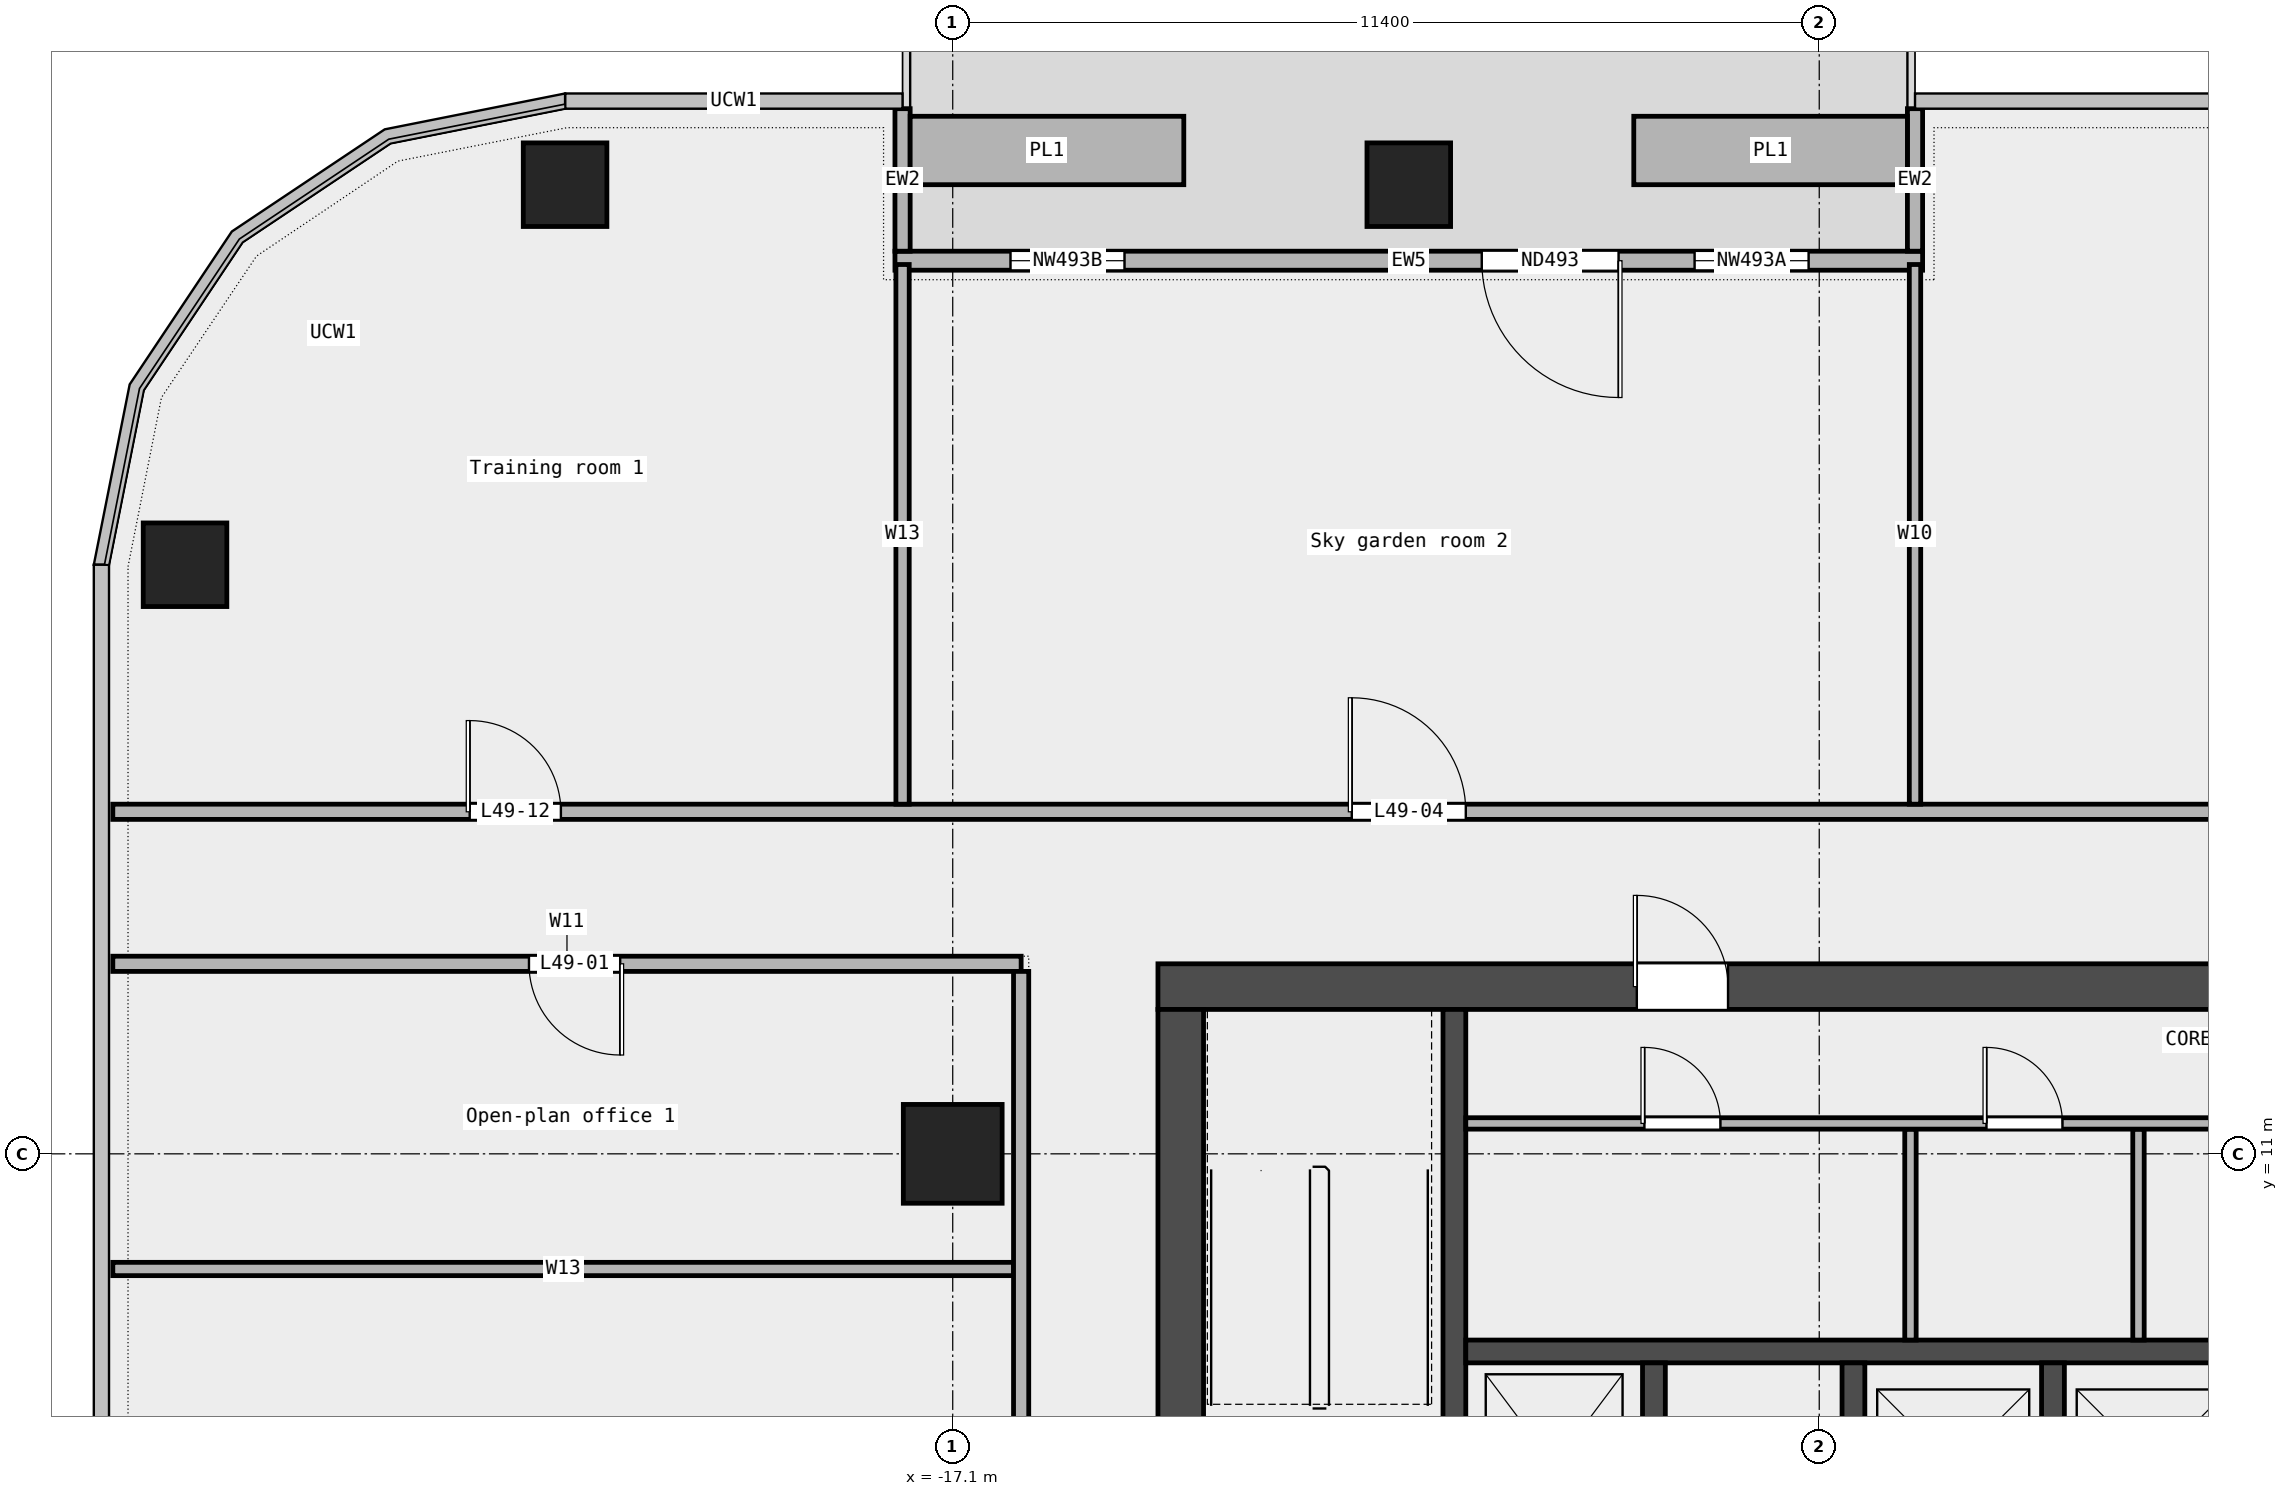
"""IFC4 building model, lengths in metres.
Left out: names, types, materials, properties, quantities, classifications, styles, units other than length and angle.
Written with IfcOpenShell. Run it as: python <this file> out.ifc"""

import sys

from ifc_helpers import new_model, si_unit, direction, frame, frame_2d, origin, origin_2d, place, context, subcontext, project, spatial, rectangle, extrude, element, fill, save


model = new_model("IFC4")
c1 = context("Model", 3, precision=1e-05, world=origin(), true_north=direction((0.0, 1.0)))
c2 = subcontext(c1, "Body", "Model", "MODEL_VIEW")
j1 = project(units=[si_unit("LENGTHUNIT", "METRE"), si_unit("PLANEANGLEUNIT", "RADIAN")], contexts=[c1])
p1 = place(None, origin())
s1 = spatial("IfcSite", under=j1, at=p1, CompositionType="ELEMENT")
p2 = place(p1, origin())
s2 = spatial("IfcBuilding", under=s1, at=p2, CompositionType="ELEMENT")
p3 = place(p2, frame((0.0, 0.0, 231.0)))
s3 = spatial("IfcBuildingStorey", under=s2, at=p3, CompositionType="ELEMENT", Elevation=231.0)
for number, where, z_axis, x_axis in (
    (1, (-11.1, 23.75, 0.0), (0.0, 0.0, 1.0), (1.0, 0.0, 0.0)),
    (2, (-22.2, 23.75, 0.0), (0.0, 0.0, 1.0), (1.0, 0.0, 0.0)),
    (3, (-27.2, 18.75, 0.0), (0.0, 0.0, 1.0), (1.0, 0.0, 0.0)),
):
    element("IfcColumn", number, at=place(p3, frame(where, z_axis=z_axis, x_axis=x_axis)), inside=s3, PredefinedType="COLUMN", context=c2, shape_type="SweptSolid", body=[
        extrude(rectangle(XDim=1.1, YDim=1.1, at=origin_2d()), origin(), (0.0, 0.0, 1.0), 3.6),
    ])
p4 = place(p3, frame((-17.1, 11.0, 0.0), z_axis=(0.0, 0.0, 1.0), x_axis=(1.0, 0.0, 0.0)))
e4 = element("IfcColumn", 4, at=p4, inside=s3, PredefinedType="COLUMN", context=c2, shape_type="SweptSolid", body=[
    extrude(rectangle(XDim=1.3, YDim=1.3, at=origin_2d()), origin(), (0.0, 0.0, 1.0), 3.6),
])
p5 = place(p3, frame((-4.34, 22.75, 0.0), z_axis=(0.0, 0.0, 1.0), x_axis=(-1.0, 0.0, 0.0)))
e5 = element("IfcWall", 5, at=p5, inside=s3, PredefinedType="STANDARD", context=c2, shape_type="SweptSolid", body=[
    extrude(rectangle(XDim=13.52, YDim=0.25, at=frame_2d((6.76, 0.0))), origin(), (0.0, 0.0, 1.0), 3.6),
])
p6 = place(p5, frame((1.5, 0.0, 0.45)))
e6 = element("IfcOpeningElement", 6, at=p6, cuts=e5, PredefinedType="OPENING", context=c2, shape_type="SweptSolid", body=[
    extrude(rectangle(XDim=1.5, YDim=2.4, at=frame_2d((0.75, 1.2))), frame((0.0, 0.137, 0.0), z_axis=(0.0, -1.0, 0.0), x_axis=(1.0, 0.0, 0.0)), (0.0, 0.0, 1.0), 0.274),
])
p7 = place(p5, frame((4.0, 0.0, 0.0)))
e7 = element("IfcOpeningElement", 7, at=p7, cuts=e5, PredefinedType="OPENING", context=c2, shape_type="SweptSolid", body=[
    extrude(rectangle(XDim=1.8, YDim=2.4, at=frame_2d((0.9, 1.2))), frame((0.0, 0.137, 0.0), z_axis=(0.0, -1.0, 0.0), x_axis=(1.0, 0.0, 0.0)), (0.0, 0.0, 1.0), 0.274),
])
p8 = place(p5, frame((10.5, 0.0, 0.45)))
e8 = element("IfcOpeningElement", 8, at=p8, cuts=e5, PredefinedType="OPENING", context=c2, shape_type="SweptSolid", body=[
    extrude(rectangle(XDim=1.5, YDim=2.4, at=frame_2d((0.75, 1.2))), frame((0.0, 0.137, 0.0), z_axis=(0.0, -1.0, 0.0), x_axis=(1.0, 0.0, 0.0)), (0.0, 0.0, 1.0), 0.274),
])
for number, where, z_axis, x_axis in (
    (9, (-4.44, 24.75, 0.0), (0.0, 0.0, 1.0), (0.0, -1.0, 0.0)),
    (10, (-17.76, 24.75, 0.0), (0.0, 0.0, 1.0), (0.0, -1.0, 0.0)),
):
    element("IfcWall", number, at=place(p3, frame(where, z_axis=z_axis, x_axis=x_axis)), inside=s3, PredefinedType="STANDARD", context=c2, shape_type="SweptSolid", body=[
        extrude(rectangle(XDim=1.875, YDim=0.2, at=frame_2d((0.938, 0.0))), origin(), (0.0, 0.0, 1.0), 3.6),
    ])
for number, where, z_axis, x_axis in (
    (11, (-4.54, 24.2, 0.0), (0.0, 0.0, 1.0), (-1.0, 0.0, 0.0)),
    (12, (-14.06, 24.2, 0.0), (0.0, 0.0, 1.0), (-1.0, 0.0, 0.0)),
):
    element("IfcWall", number, at=place(p3, frame(where, z_axis=z_axis, x_axis=x_axis)), inside=s3, PredefinedType="STANDARD", context=c2, shape_type="SweptSolid", body=[
        extrude(rectangle(XDim=3.6, YDim=0.9, at=frame_2d((1.8, 0.0))), origin(), (0.0, 0.0, 1.0), 0.7),
    ])
p9 = place(p3, frame((-28.15, 9.485, 0.0), z_axis=(0.0, 0.0, 1.0), x_axis=(1.0, 0.0, 0.0)))
e13 = element("IfcWall", 13, at=p9, inside=s3, PredefinedType="PARTITIONING", context=c2, shape_type="SweptSolid", body=[
    extrude(rectangle(XDim=11.85, YDim=0.175, at=frame_2d((5.925, 0.0))), origin(), (0.0, 0.0, 1.0), 3.6),
])
p10 = place(p3, frame((-28.15, 13.5, 0.0), z_axis=(0.0, 0.0, 1.0), x_axis=(1.0, 0.0, 0.0)))
e14 = element("IfcWall", 14, at=p10, inside=s3, PredefinedType="PARTITIONING", context=c2, shape_type="SweptSolid", body=[
    extrude(rectangle(XDim=11.95, YDim=0.2, at=frame_2d((5.975, 0.0))), origin(), (0.0, 0.0, 1.0), 3.6),
])
p11 = place(p10, frame((5.475, 0.0, 0.0)))
e15 = element("IfcOpeningElement", 15, at=p11, cuts=e14, PredefinedType="OPENING", context=c2, shape_type="SweptSolid", body=[
    extrude(rectangle(XDim=1.2, YDim=2.1, at=frame_2d((0.6, 1.05))), frame((0.0, 0.112, 0.0), z_axis=(0.0, -1.0, 0.0), x_axis=(1.0, 0.0, 0.0)), (0.0, 0.0, 1.0), 0.224),
])
p12 = place(p3, frame((-28.15, 15.5, 0.0), z_axis=(0.0, 0.0, 1.0), x_axis=(1.0, 0.0, 0.0)))
e16 = element("IfcWall", 16, at=p12, inside=s3, PredefinedType="PARTITIONING", context=c2, shape_type="SweptSolid", body=[
    extrude(rectangle(XDim=56.3, YDim=0.2, at=frame_2d((28.15, 0.0))), origin(), (0.0, 0.0, 1.0), 3.6),
])
p13 = place(p12, frame((16.3, 0.0, 0.0)))
e17 = element("IfcOpeningElement", 17, at=p13, cuts=e16, PredefinedType="OPENING", context=c2, shape_type="SweptSolid", body=[
    extrude(rectangle(XDim=1.5, YDim=2.1, at=frame_2d((0.75, 1.05))), frame((0.0, 0.112, 0.0), z_axis=(0.0, -1.0, 0.0), x_axis=(1.0, 0.0, 0.0)), (0.0, 0.0, 1.0), 0.224),
])
p14 = place(p12, frame((46.225, 0.0, 0.0)))
e18 = element("IfcOpeningElement", 18, at=p14, cuts=e16, PredefinedType="OPENING", context=c2, shape_type="SweptSolid", body=[
    extrude(rectangle(XDim=1.8, YDim=2.1, at=frame_2d((0.9, 1.05))), frame((0.0, 0.112, 0.0), z_axis=(0.0, -1.0, 0.0), x_axis=(1.0, 0.0, 0.0)), (0.0, 0.0, 1.0), 0.224),
])
p15 = place(p12, frame((30.18, 0.0, 0.0)))
e19 = element("IfcOpeningElement", 19, at=p15, cuts=e16, PredefinedType="OPENING", context=c2, shape_type="SweptSolid", body=[
    extrude(rectangle(XDim=1.5, YDim=2.1, at=frame_2d((0.75, 1.05))), frame((0.0, 0.112, 0.0), z_axis=(0.0, -1.0, 0.0), x_axis=(1.0, 0.0, 0.0)), (0.0, 0.0, 1.0), 0.224),
])
p16 = place(p12, frame((4.695, 0.0, 0.0)))
e20 = element("IfcOpeningElement", 20, at=p16, cuts=e16, PredefinedType="OPENING", context=c2, shape_type="SweptSolid", body=[
    extrude(rectangle(XDim=1.2, YDim=2.1, at=frame_2d((0.6, 1.05))), frame((0.0, 0.112, 0.0), z_axis=(0.0, -1.0, 0.0), x_axis=(1.0, 0.0, 0.0)), (0.0, 0.0, 1.0), 0.224),
])
p17 = place(p3, frame((-17.76, 15.6, 0.0), z_axis=(0.0, 0.0, 1.0), x_axis=(0.0, 1.0, 0.0)))
e21 = element("IfcWall", 21, at=p17, inside=s3, PredefinedType="PARTITIONING", context=c2, shape_type="SweptSolid", body=[
    extrude(rectangle(XDim=7.1, YDim=0.175, at=frame_2d((3.55, 0.0))), origin(), (0.0, 0.0, 1.0), 3.6),
])
p18 = place(p3, frame((-16.2, -7.1, 0.0), z_axis=(0.0, 0.0, 1.0), x_axis=(0.0, 1.0, 0.0)))
e22 = element("IfcWall", 22, at=p18, inside=s3, PredefinedType="PARTITIONING", context=c2, shape_type="SweptSolid", body=[
    extrude(rectangle(XDim=20.5, YDim=0.2, at=frame_2d((10.25, 0.0))), origin(), (0.0, 0.0, 1.0), 3.6),
])
p19 = place(p18, frame((11.63, 0.0, 0.0)))
e23 = element("IfcOpeningElement", 23, at=p19, cuts=e22, PredefinedType="OPENING", context=c2, shape_type="SweptSolid", body=[
    extrude(rectangle(XDim=1.5, YDim=2.1, at=frame_2d((0.75, 1.05))), frame((0.0, 0.112, 0.0), z_axis=(0.0, -1.0, 0.0), x_axis=(1.0, 0.0, 0.0)), (0.0, 0.0, 1.0), 0.224),
])
p20 = place(p3, frame((-4.44, 15.6, 0.0), z_axis=(0.0, 0.0, 1.0), x_axis=(0.0, 1.0, 0.0)))
e24 = element("IfcWall", 24, at=p20, inside=s3, PredefinedType="PARTITIONING", context=c2, shape_type="SweptSolid", body=[
    extrude(rectangle(XDim=7.1, YDim=0.15, at=frame_2d((3.55, 0.0))), origin(), (0.0, 0.0, 1.0), 3.6),
])
p21 = place(p3, frame((-14.4, 13.2, 0.0), z_axis=(0.0, 0.0, 1.0), x_axis=(1.0, 0.0, 0.0)))
e25 = element("IfcWall", 25, at=p21, inside=s3, PredefinedType="SHEAR", context=c2, shape_type="SweptSolid", body=[
    extrude(rectangle(XDim=28.8, YDim=0.6, at=frame_2d((14.4, 0.0))), origin(), (0.0, 0.0, 1.0), 3.7),
])
p22 = place(p21, frame((6.3, 0.0, 0.0)))
e26 = element("IfcOpeningElement", 26, at=p22, cuts=e25, PredefinedType="OPENING", context=c2, shape_type="SweptSolid", body=[
    extrude(rectangle(XDim=1.2, YDim=2.1, at=frame_2d((0.6, 1.05))), frame((0.0, 0.312, 0.0), z_axis=(0.0, -1.0, 0.0), x_axis=(1.0, 0.0, 0.0)), (0.0, 0.0, 1.0), 0.624),
])
p23 = place(p21, frame((21.3, 0.0, 0.0)))
e27 = element("IfcOpeningElement", 27, at=p23, cuts=e25, PredefinedType="OPENING", context=c2, shape_type="SweptSolid", body=[
    extrude(rectangle(XDim=1.2, YDim=2.1, at=frame_2d((0.6, 1.05))), frame((0.0, 0.312, 0.0), z_axis=(0.0, -1.0, 0.0), x_axis=(1.0, 0.0, 0.0)), (0.0, 0.0, 1.0), 0.624),
])
p24 = place(p3, frame((-14.1, -6.6, 0.0), z_axis=(0.0, 0.0, 1.0), x_axis=(0.0, 1.0, 0.0)))
e28 = element("IfcWall", 28, at=p24, inside=s3, PredefinedType="SHEAR", context=c2, shape_type="SweptSolid", body=[
    extrude(rectangle(XDim=19.5, YDim=0.6, at=frame_2d((9.75, 0.0))), origin(), (0.0, 0.0, 1.0), 3.7),
])
p25 = place(p24, frame((9.3, 0.0, 0.0)))
e29 = element("IfcOpeningElement", 29, at=p25, cuts=e28, PredefinedType="OPENING", context=c2, shape_type="SweptSolid", body=[
    extrude(rectangle(XDim=1.8, YDim=2.1, at=frame_2d((0.9, 1.05))), frame((0.0, 0.312, 0.0), z_axis=(0.0, -1.0, 0.0), x_axis=(1.0, 0.0, 0.0)), (0.0, 0.0, 1.0), 0.624),
])
p26 = place(p3, frame((-10.5, 5.25, 0.0), z_axis=(0.0, 0.0, 1.0), x_axis=(0.0, 1.0, 0.0)))
e30 = element("IfcWall", 30, at=p26, inside=s3, PredefinedType="SHEAR", context=c2, shape_type="SweptSolid", body=[
    extrude(rectangle(XDim=7.65, YDim=0.3, at=frame_2d((3.825, 0.0))), origin(), (0.0, 0.0, 1.0), 3.7),
])
p27 = place(p3, frame((-10.35, 8.4, 0.0), z_axis=(0.0, 0.0, 1.0), x_axis=(1.0, 0.0, 0.0)))
e31 = element("IfcWall", 31, at=p27, inside=s3, PredefinedType="SOLIDWALL", context=c2, shape_type="SweptSolid", body=[
    extrude(rectangle(XDim=20.7, YDim=0.3, at=frame_2d((10.35, 0.0))), origin(), (0.0, 0.0, 1.0), 3.7),
])
for number, where, z_axis, x_axis in (
    (32, (-7.875, 5.55, 0.0), (0.0, 0.0, 1.0), (0.0, 1.0, 0.0)),
    (33, (-5.25, 5.55, 0.0), (0.0, 0.0, 1.0), (0.0, 1.0, 0.0)),
    (34, (-2.625, 5.55, 0.0), (0.0, 0.0, 1.0), (0.0, 1.0, 0.0)),
):
    element("IfcWall", number, at=place(p3, frame(where, z_axis=z_axis, x_axis=x_axis)), inside=s3, PredefinedType="SOLIDWALL", context=c2, shape_type="SweptSolid", body=[
        extrude(rectangle(XDim=2.7, YDim=0.3, at=frame_2d((1.35, 0.0))), origin(), (0.0, 0.0, 1.0), 3.7),
    ])
for number, where, z_axis, x_axis in (
    (35, (-4.5, 8.55, 0.0), (0.0, 0.0, 1.0), (0.0, 1.0, 0.0)),
    (36, (-1.5, 8.55, 0.0), (0.0, 0.0, 1.0), (0.0, 1.0, 0.0)),
):
    element("IfcWall", number, at=place(p3, frame(where, z_axis=z_axis, x_axis=x_axis)), inside=s3, PredefinedType="PARTITIONING", context=c2, shape_type="SweptSolid", body=[
        extrude(rectangle(XDim=2.775, YDim=0.15, at=frame_2d((1.387, 0.0))), origin(), (0.0, 0.0, 1.0), 3.7),
    ])
p28 = place(p3, frame((-10.35, 11.4, 0.0), z_axis=(0.0, 0.0, 1.0), x_axis=(1.0, 0.0, 0.0)))
e37 = element("IfcWall", 37, at=p28, inside=s3, PredefinedType="PARTITIONING", context=c2, shape_type="SweptSolid", body=[
    extrude(rectangle(XDim=20.7, YDim=0.15, at=frame_2d((10.35, 0.0))), origin(), (0.0, 0.0, 1.0), 3.7),
])
p29 = place(p28, frame((2.35, 0.0, 0.0)))
e38 = element("IfcOpeningElement", 38, at=p29, cuts=e37, PredefinedType="OPENING", context=c2, shape_type="SweptSolid", body=[
    extrude(rectangle(XDim=1.0, YDim=2.1, at=frame_2d((0.5, 1.05))), frame((0.0, 0.087, 0.0), z_axis=(0.0, -1.0, 0.0), x_axis=(1.0, 0.0, 0.0)), (0.0, 0.0, 1.0), 0.174),
])
p30 = place(p28, frame((6.85, 0.0, 0.0)))
e39 = element("IfcOpeningElement", 39, at=p30, cuts=e37, PredefinedType="OPENING", context=c2, shape_type="SweptSolid", body=[
    extrude(rectangle(XDim=1.0, YDim=2.1, at=frame_2d((0.5, 1.05))), frame((0.0, 0.087, 0.0), z_axis=(0.0, -1.0, 0.0), x_axis=(1.0, 0.0, 0.0)), (0.0, 0.0, 1.0), 0.174),
])
p31 = place(p28, frame((11.35, 0.0, 0.0)))
e40 = element("IfcOpeningElement", 40, at=p31, cuts=e37, PredefinedType="OPENING", context=c2, shape_type="SweptSolid", body=[
    extrude(rectangle(XDim=1.0, YDim=2.1, at=frame_2d((0.5, 1.05))), frame((0.0, 0.087, 0.0), z_axis=(0.0, -1.0, 0.0), x_axis=(1.0, 0.0, 0.0)), (0.0, 0.0, 1.0), 0.174),
])
p32 = place(p28, frame((17.35, 0.0, 0.0)))
e41 = element("IfcOpeningElement", 41, at=p32, cuts=e37, PredefinedType="OPENING", context=c2, shape_type="SweptSolid", body=[
    extrude(rectangle(XDim=1.0, YDim=2.1, at=frame_2d((0.5, 1.05))), frame((0.0, 0.087, 0.0), z_axis=(0.0, -1.0, 0.0), x_axis=(1.0, 0.0, 0.0)), (0.0, 0.0, 1.0), 0.174),
])
p33 = place(p6, origin())
e42 = element("IfcWindow", 42, at=p33, inside=s3, PartitioningType="SINGLE_PANEL", PredefinedType="WINDOW", context=c2, shape_type="SweptSolid", body=[
    extrude(rectangle(XDim=1.5, YDim=2.4, at=frame_2d((0.75, 1.2))), frame((0.0, 0.03, 0.0), z_axis=(0.0, -1.0, 0.0), x_axis=(1.0, 0.0, 0.0)), (0.0, 0.0, 1.0), 0.06),
])
fill(e6, e42)
p34 = place(p7, origin())
e43 = element("IfcDoor", 43, at=p34, inside=s3, OperationType="DOUBLE_DOOR_SINGLE_SWING", PredefinedType="DOOR", context=c2, shape_type="SweptSolid", body=[
    extrude(rectangle(XDim=1.8, YDim=2.4, at=frame_2d((0.9, 1.2))), frame((0.0, 0.025, 0.0), z_axis=(0.0, -1.0, 0.0), x_axis=(1.0, 0.0, 0.0)), (0.0, 0.0, 1.0), 0.05),
])
fill(e7, e43)
p35 = place(p8, origin())
e44 = element("IfcWindow", 44, at=p35, inside=s3, PartitioningType="SINGLE_PANEL", PredefinedType="WINDOW", context=c2, shape_type="SweptSolid", body=[
    extrude(rectangle(XDim=1.5, YDim=2.4, at=frame_2d((0.75, 1.2))), frame((0.0, 0.03, 0.0), z_axis=(0.0, -1.0, 0.0), x_axis=(1.0, 0.0, 0.0)), (0.0, 0.0, 1.0), 0.06),
])
fill(e8, e44)
p36 = place(p11, origin())
e45 = element("IfcDoor", 45, at=p36, inside=s3, OperationType="SINGLE_SWING_LEFT", PredefinedType="DOOR", context=c2, shape_type="SweptSolid", body=[
    extrude(rectangle(XDim=1.2, YDim=2.1, at=frame_2d((0.6, 1.05))), frame((0.0, 0.025, 0.0), z_axis=(0.0, -1.0, 0.0), x_axis=(1.0, 0.0, 0.0)), (0.0, 0.0, 1.0), 0.05),
])
fill(e15, e45)
p37 = place(p13, origin())
e46 = element("IfcDoor", 46, at=p37, inside=s3, OperationType="DOUBLE_DOOR_SINGLE_SWING", PredefinedType="DOOR", context=c2, shape_type="SweptSolid", body=[
    extrude(rectangle(XDim=1.5, YDim=2.1, at=frame_2d((0.75, 1.05))), frame((0.0, 0.025, 0.0), z_axis=(0.0, -1.0, 0.0), x_axis=(1.0, 0.0, 0.0)), (0.0, 0.0, 1.0), 0.05),
])
fill(e17, e46)
p38 = place(p16, origin())
e47 = element("IfcDoor", 47, at=p38, inside=s3, OperationType="SINGLE_SWING_LEFT", PredefinedType="DOOR", context=c2, shape_type="SweptSolid", body=[
    extrude(rectangle(XDim=1.2, YDim=2.1, at=frame_2d((0.6, 1.05))), frame((0.0, 0.025, 0.0), z_axis=(0.0, -1.0, 0.0), x_axis=(1.0, 0.0, 0.0)), (0.0, 0.0, 1.0), 0.05),
])
fill(e20, e47)
p39 = place(p29, origin())
e48 = element("IfcDoor", 48, at=p39, inside=s3, OperationType="SINGLE_SWING_LEFT", PredefinedType="DOOR", context=c2, shape_type="SweptSolid", body=[
    extrude(rectangle(XDim=1.0, YDim=2.1, at=frame_2d((0.5, 1.05))), frame((0.0, 0.025, 0.0), z_axis=(0.0, -1.0, 0.0), x_axis=(1.0, 0.0, 0.0)), (0.0, 0.0, 1.0), 0.05),
])
fill(e38, e48)
p40 = place(p30, origin())
e49 = element("IfcDoor", 49, at=p40, inside=s3, OperationType="SINGLE_SWING_LEFT", PredefinedType="DOOR", context=c2, shape_type="SweptSolid", body=[
    extrude(rectangle(XDim=1.0, YDim=2.1, at=frame_2d((0.5, 1.05))), frame((0.0, 0.025, 0.0), z_axis=(0.0, -1.0, 0.0), x_axis=(1.0, 0.0, 0.0)), (0.0, 0.0, 1.0), 0.05),
])
fill(e39, e49)
p41 = place(p22, origin())
e50 = element("IfcDoor", 50, at=p41, inside=s3, OperationType="SINGLE_SWING_LEFT", PredefinedType="DOOR", context=c2, shape_type="SweptSolid", body=[
    extrude(rectangle(XDim=1.2, YDim=2.1, at=frame_2d((0.6, 1.05))), frame((0.0, 0.025, 0.0), z_axis=(0.0, -1.0, 0.0), x_axis=(1.0, 0.0, 0.0)), (0.0, 0.0, 1.0), 0.05),
])
fill(e26, e50)
save(model, sys.argv[1])
